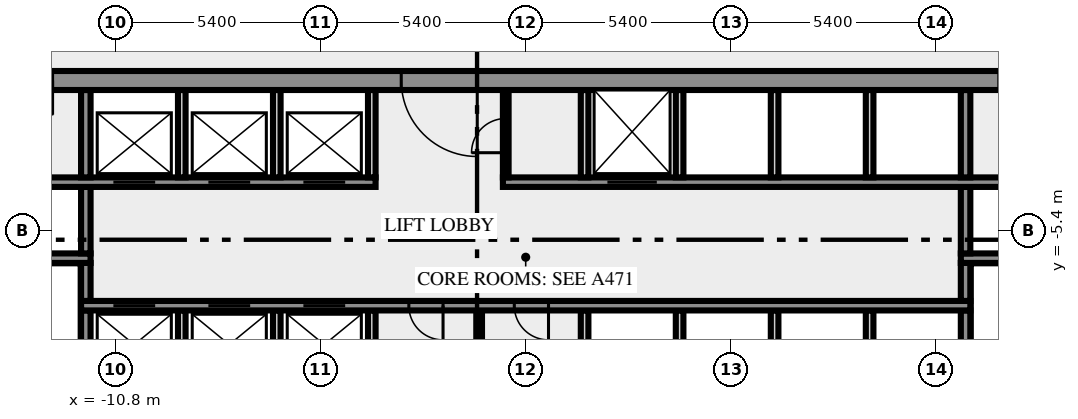
"""IFC4 building model, lengths in metres.
Left out: names, types, materials, properties, quantities, classifications, styles, units other than length and angle.
Written with IfcOpenShell. Run it as: python <this file> out.ifc"""

import sys

from ifc_helpers import new_model, si_unit, direction, frame, frame_2d, origin, place, context, subcontext, project, spatial, rectangle, extrude, element, fill, save


model = new_model("IFC4")
c1 = context("Model", 3, precision=1e-05, world=origin(), true_north=direction((0.0, 1.0)))
c2 = subcontext(c1, "Body", "Model", "MODEL_VIEW")
j1 = project(units=[si_unit("LENGTHUNIT", "METRE"), si_unit("PLANEANGLEUNIT", "RADIAN")], contexts=[c1])
p1 = place(None, origin())
s1 = spatial("IfcSite", under=j1, at=p1, CompositionType="ELEMENT")
p2 = place(p1, origin())
s2 = spatial("IfcBuilding", under=s1, at=p2, CompositionType="ELEMENT")
p3 = place(p2, frame((0.0, 0.0, 113.0)))
s3 = spatial("IfcBuildingStorey", under=s2, at=p3, CompositionType="ELEMENT", Elevation=113.0)
p4 = place(p3, frame((-11.575, -10.5, 0.0), z_axis=(0.0, 0.0, 1.0), x_axis=(0.0, 1.0, 0.0)))
e1 = element("IfcWall", 1, at=p4, inside=s3, PredefinedType="SHEAR", context=c2, shape_type="SweptSolid", body=[
    extrude(rectangle(XDim=3.0, YDim=0.25, at=frame_2d((1.5, 0.0))), origin(), (0.0, 0.0, 1.0), 3.65),
])
for number, where, z_axis, x_axis in (
    (2, (-9.05, -10.5, 0.0), (0.0, 0.0, 1.0), (0.0, 1.0, 0.0)),
    (3, (-6.55, -10.5, 0.0), (0.0, 0.0, 1.0), (0.0, 1.0, 0.0)),
    (4, (-4.05, -10.5, 0.0), (0.0, 0.0, 1.0), (0.0, 1.0, 0.0)),
):
    element("IfcWall", number, at=place(p3, frame(where, z_axis=z_axis, x_axis=x_axis)), inside=s3, PredefinedType="SOLIDWALL", context=c2, shape_type="SweptSolid", body=[
        extrude(rectangle(XDim=3.0, YDim=0.2, at=frame_2d((1.5, 0.0))), origin(), (0.0, 0.0, 1.0), 3.65),
    ])
p5 = place(p3, frame((-1.225, -10.5, 0.0), z_axis=(0.0, 0.0, 1.0), x_axis=(0.0, 1.0, 0.0)))
e5 = element("IfcWall", 5, at=p5, inside=s3, PredefinedType="PARTITIONING", context=c2, shape_type="SweptSolid", body=[
    extrude(rectangle(XDim=3.0, YDim=0.15, at=frame_2d((1.5, 0.0))), origin(), (0.0, 0.0, 1.0), 3.65),
])
for number, where, z_axis, x_axis in (
    (6, (1.55, -10.5, 0.0), (0.0, 0.0, 1.0), (0.0, 1.0, 0.0)),
    (7, (4.05, -10.5, 0.0), (0.0, 0.0, 1.0), (0.0, 1.0, 0.0)),
    (8, (6.55, -10.5, 0.0), (0.0, 0.0, 1.0), (0.0, 1.0, 0.0)),
    (9, (9.05, -10.5, 0.0), (0.0, 0.0, 1.0), (0.0, 1.0, 0.0)),
):
    element("IfcWall", number, at=place(p3, frame(where, z_axis=z_axis, x_axis=x_axis)), inside=s3, PredefinedType="SOLIDWALL", context=c2, shape_type="SweptSolid", body=[
        extrude(rectangle(XDim=3.0, YDim=0.2, at=frame_2d((1.5, 0.0))), origin(), (0.0, 0.0, 1.0), 3.65),
    ])
p6 = place(p3, frame((11.575, -10.5, 0.0), z_axis=(0.0, 0.0, 1.0), x_axis=(0.0, 1.0, 0.0)))
e10 = element("IfcWall", 10, at=p6, inside=s3, PredefinedType="SHEAR", context=c2, shape_type="SweptSolid", body=[
    extrude(rectangle(XDim=3.0, YDim=0.25, at=frame_2d((1.5, 0.0))), origin(), (0.0, 0.0, 1.0), 3.65),
])
p7 = place(p3, frame((11.7, -7.375, 0.0), z_axis=(0.0, 0.0, 1.0), x_axis=(-1.0, 0.0, 0.0)))
e11 = element("IfcWall", 11, at=p7, inside=s3, PredefinedType="SHEAR", context=c2, shape_type="SweptSolid", body=[
    extrude(rectangle(XDim=23.4, YDim=0.25, at=frame_2d((11.7, 0.0))), origin(), (0.0, 0.0, 1.0), 3.65),
])
p8 = place(p7, frame((21.45, 0.0, 0.0)))
e12 = element("IfcOpeningElement", 12, at=p8, cuts=e11, PredefinedType="OPENING", context=c2, shape_type="SweptSolid", body=[
    extrude(rectangle(XDim=1.1, YDim=2.1, at=frame_2d((0.55, 1.05))), frame((0.0, 0.135, 0.0), z_axis=(0.0, -1.0, 0.0), x_axis=(1.0, 0.0, 0.0)), (0.0, 0.0, 1.0), 0.27),
])
p9 = place(p7, frame((18.95, 0.0, 0.0)))
e13 = element("IfcOpeningElement", 13, at=p9, cuts=e11, PredefinedType="OPENING", context=c2, shape_type="SweptSolid", body=[
    extrude(rectangle(XDim=1.1, YDim=2.1, at=frame_2d((0.55, 1.05))), frame((0.0, 0.135, 0.0), z_axis=(0.0, -1.0, 0.0), x_axis=(1.0, 0.0, 0.0)), (0.0, 0.0, 1.0), 0.27),
])
p10 = place(p7, frame((16.45, 0.0, 0.0)))
e14 = element("IfcOpeningElement", 14, at=p10, cuts=e11, PredefinedType="OPENING", context=c2, shape_type="SweptSolid", body=[
    extrude(rectangle(XDim=1.1, YDim=2.1, at=frame_2d((0.55, 1.05))), frame((0.0, 0.135, 0.0), z_axis=(0.0, -1.0, 0.0), x_axis=(1.0, 0.0, 0.0)), (0.0, 0.0, 1.0), 0.27),
])
p11 = place(p7, frame((13.875, 0.0, 0.0)))
e15 = element("IfcOpeningElement", 15, at=p11, cuts=e11, PredefinedType="OPENING", context=c2, shape_type="SweptSolid", body=[
    extrude(rectangle(XDim=0.9, YDim=2.1, at=frame_2d((0.45, 1.05))), frame((0.0, 0.135, 0.0), z_axis=(0.0, -1.0, 0.0), x_axis=(1.0, 0.0, 0.0)), (0.0, 0.0, 1.0), 0.27),
])
p12 = place(p7, frame((11.1, 0.0, 0.0)))
e16 = element("IfcOpeningElement", 16, at=p12, cuts=e11, PredefinedType="OPENING", context=c2, shape_type="SweptSolid", body=[
    extrude(rectangle(XDim=0.9, YDim=2.1, at=frame_2d((0.45, 1.05))), frame((0.0, 0.135, 0.0), z_axis=(0.0, -1.0, 0.0), x_axis=(1.0, 0.0, 0.0)), (0.0, 0.0, 1.0), 0.27),
])
for number, where, z_axis, x_axis in (
    (17, (-11.575, -7.25, 0.0), (0.0, 0.0, 1.0), (0.0, 1.0, 0.0)),
    (18, (11.575, -7.25, 0.0), (0.0, 0.0, 1.0), (0.0, 1.0, 0.0)),
):
    element("IfcWall", number, at=place(p3, frame(where, z_axis=z_axis, x_axis=x_axis)), inside=s3, PredefinedType="SHEAR", context=c2, shape_type="SweptSolid", body=[
        extrude(rectangle(XDim=1.0, YDim=0.25, at=frame_2d((0.5, 0.0))), origin(), (0.0, 0.0, 1.0), 3.65),
    ])
p13 = place(p3, frame((-11.45, -6.125, 0.0), z_axis=(0.0, 0.0, 1.0), x_axis=(-1.0, 0.0, 0.0)))
e19 = element("IfcWall", 19, at=p13, inside=s3, PredefinedType="SHEAR", context=c2, shape_type="SweptSolid", body=[
    extrude(rectangle(XDim=8.05, YDim=0.25, at=frame_2d((4.025, 0.0))), origin(), (0.0, 0.0, 1.0), 3.65),
])
p14 = place(p13, frame((6.2, 0.0, 0.0)))
e20 = element("IfcOpeningElement", 20, at=p14, cuts=e19, PredefinedType="OPENING", context=c2, shape_type="SweptSolid", body=[
    extrude(rectangle(XDim=1.8, YDim=2.1, at=frame_2d((0.9, 1.05))), frame((0.0, 0.135, 0.0), z_axis=(0.0, -1.0, 0.0), x_axis=(1.0, 0.0, 0.0)), (0.0, 0.0, 1.0), 0.27),
])
p15 = place(p3, frame((19.5, -6.125, 0.0), z_axis=(0.0, 0.0, 1.0), x_axis=(-1.0, 0.0, 0.0)))
e21 = element("IfcWall", 21, at=p15, inside=s3, PredefinedType="SHEAR", context=c2, shape_type="SweptSolid", body=[
    extrude(rectangle(XDim=8.05, YDim=0.25, at=frame_2d((4.025, 0.0))), origin(), (0.0, 0.0, 1.0), 3.65),
])
p16 = place(p15, frame((0.05, 0.0, 0.0)))
e22 = element("IfcOpeningElement", 22, at=p16, cuts=e21, PredefinedType="OPENING", context=c2, shape_type="SweptSolid", body=[
    extrude(rectangle(XDim=1.8, YDim=2.1, at=frame_2d((0.9, 1.05))), frame((0.0, 0.135, 0.0), z_axis=(0.0, -1.0, 0.0), x_axis=(1.0, 0.0, 0.0)), (0.0, 0.0, 1.0), 0.27),
])
for number, where, z_axis, x_axis in (
    (23, (-11.575, -6.0, 0.0), (0.0, 0.0, 1.0), (0.0, 1.0, 0.0)),
    (24, (11.575, -6.0, 0.0), (0.0, 0.0, 1.0), (0.0, 1.0, 0.0)),
):
    element("IfcWall", number, at=place(p3, frame(where, z_axis=z_axis, x_axis=x_axis)), inside=s3, PredefinedType="SHEAR", context=c2, shape_type="SweptSolid", body=[
        extrude(rectangle(XDim=1.75, YDim=0.25, at=frame_2d((0.875, 0.0))), origin(), (0.0, 0.0, 1.0), 3.65),
    ])
p17 = place(p3, frame((-14.35, -4.125, 0.0), z_axis=(0.0, 0.0, 1.0), x_axis=(1.0, 0.0, 0.0)))
e25 = element("IfcWall", 25, at=p17, inside=s3, PredefinedType="SHEAR", context=c2, shape_type="SweptSolid", body=[
    extrude(rectangle(XDim=10.4, YDim=0.25, at=frame_2d((5.2, 0.0))), origin(), (0.0, 0.0, 1.0), 3.65),
])
p18 = place(p17, frame((3.5, 0.0, 0.0)))
e26 = element("IfcOpeningElement", 26, at=p18, cuts=e25, PredefinedType="OPENING", context=c2, shape_type="SweptSolid", body=[
    extrude(rectangle(XDim=1.1, YDim=2.1, at=frame_2d((0.55, 1.05))), frame((0.0, 0.135, 0.0), z_axis=(0.0, -1.0, 0.0), x_axis=(1.0, 0.0, 0.0)), (0.0, 0.0, 1.0), 0.27),
])
p19 = place(p17, frame((6.0, 0.0, 0.0)))
e27 = element("IfcOpeningElement", 27, at=p19, cuts=e25, PredefinedType="OPENING", context=c2, shape_type="SweptSolid", body=[
    extrude(rectangle(XDim=1.1, YDim=2.1, at=frame_2d((0.55, 1.05))), frame((0.0, 0.135, 0.0), z_axis=(0.0, -1.0, 0.0), x_axis=(1.0, 0.0, 0.0)), (0.0, 0.0, 1.0), 0.27),
])
p20 = place(p17, frame((8.5, 0.0, 0.0)))
e28 = element("IfcOpeningElement", 28, at=p20, cuts=e25, PredefinedType="OPENING", context=c2, shape_type="SweptSolid", body=[
    extrude(rectangle(XDim=1.1, YDim=2.1, at=frame_2d((0.55, 1.05))), frame((0.0, 0.135, 0.0), z_axis=(0.0, -1.0, 0.0), x_axis=(1.0, 0.0, 0.0)), (0.0, 0.0, 1.0), 0.27),
])
p21 = place(p3, frame((-0.6, -4.125, 0.0), z_axis=(0.0, 0.0, 1.0), x_axis=(1.0, 0.0, 0.0)))
e29 = element("IfcWall", 29, at=p21, inside=s3, PredefinedType="SHEAR", context=c2, shape_type="SweptSolid", body=[
    extrude(rectangle(XDim=14.95, YDim=0.25, at=frame_2d((7.475, 0.0))), origin(), (0.0, 0.0, 1.0), 3.65),
])
p22 = place(p21, frame((2.75, 0.0, 0.0)))
e30 = element("IfcOpeningElement", 30, at=p22, cuts=e29, PredefinedType="OPENING", context=c2, shape_type="SweptSolid", body=[
    extrude(rectangle(XDim=1.3, YDim=2.1, at=frame_2d((0.65, 1.05))), frame((0.0, 0.135, 0.0), z_axis=(0.0, -1.0, 0.0), x_axis=(1.0, 0.0, 0.0)), (0.0, 0.0, 1.0), 0.27),
])
p23 = place(p3, frame((-11.575, -4.0, 0.0), z_axis=(0.0, 0.0, 1.0), x_axis=(0.0, 1.0, 0.0)))
e31 = element("IfcWall", 31, at=p23, inside=s3, PredefinedType="SHEAR", context=c2, shape_type="SweptSolid", body=[
    extrude(rectangle(XDim=2.3, YDim=0.25, at=frame_2d((1.15, 0.0))), origin(), (0.0, 0.0, 1.0), 3.65),
])
for number, where, z_axis, x_axis in (
    (32, (-9.05, -4.0, 0.0), (0.0, 0.0, 1.0), (0.0, 1.0, 0.0)),
    (33, (-6.55, -4.0, 0.0), (0.0, 0.0, 1.0), (0.0, 1.0, 0.0)),
    (34, (-4.05, -4.0, 0.0), (0.0, 0.0, 1.0), (0.0, 1.0, 0.0)),
):
    element("IfcWall", number, at=place(p3, frame(where, z_axis=z_axis, x_axis=x_axis)), inside=s3, PredefinedType="SOLIDWALL", context=c2, shape_type="SweptSolid", body=[
        extrude(rectangle(XDim=2.3, YDim=0.2, at=frame_2d((1.15, 0.0))), origin(), (0.0, 0.0, 1.0), 3.65),
    ])
p24 = place(p3, frame((-0.525, -4.0, 0.0), z_axis=(0.0, 0.0, 1.0), x_axis=(0.0, 1.0, 0.0)))
e35 = element("IfcWall", 35, at=p24, inside=s3, PredefinedType="PARTITIONING", context=c2, shape_type="SweptSolid", body=[
    extrude(rectangle(XDim=2.3, YDim=0.15, at=frame_2d((1.15, 0.0))), origin(), (0.0, 0.0, 1.0), 3.65),
])
p25 = place(p24, frame((0.65, 0.0, 0.0)))
e36 = element("IfcOpeningElement", 36, at=p25, cuts=e35, PredefinedType="OPENING", context=c2, shape_type="SweptSolid", body=[
    extrude(rectangle(XDim=0.9, YDim=2.1, at=frame_2d((0.45, 1.05))), frame((0.0, 0.085, 0.0), z_axis=(0.0, -1.0, 0.0), x_axis=(1.0, 0.0, 0.0)), (0.0, 0.0, 1.0), 0.17),
])
for number, where, z_axis, x_axis in (
    (37, (1.55, -4.0, 0.0), (0.0, 0.0, 1.0), (0.0, 1.0, 0.0)),
    (38, (4.05, -4.0, 0.0), (0.0, 0.0, 1.0), (0.0, 1.0, 0.0)),
    (39, (6.55, -4.0, 0.0), (0.0, 0.0, 1.0), (0.0, 1.0, 0.0)),
    (40, (9.05, -4.0, 0.0), (0.0, 0.0, 1.0), (0.0, 1.0, 0.0)),
):
    element("IfcWall", number, at=place(p3, frame(where, z_axis=z_axis, x_axis=x_axis)), inside=s3, PredefinedType="SOLIDWALL", context=c2, shape_type="SweptSolid", body=[
        extrude(rectangle(XDim=2.3, YDim=0.2, at=frame_2d((1.15, 0.0))), origin(), (0.0, 0.0, 1.0), 3.65),
    ])
p26 = place(p3, frame((11.575, -4.0, 0.0), z_axis=(0.0, 0.0, 1.0), x_axis=(0.0, 1.0, 0.0)))
e41 = element("IfcWall", 41, at=p26, inside=s3, PredefinedType="SHEAR", context=c2, shape_type="SweptSolid", body=[
    extrude(rectangle(XDim=2.3, YDim=0.25, at=frame_2d((1.15, 0.0))), origin(), (0.0, 0.0, 1.0), 3.65),
])
p27 = place(p3, frame((20.49, -1.45, 0.0), z_axis=(0.0, 0.0, 1.0), x_axis=(-1.0, 0.0, 0.0)))
e42 = element("IfcWall", 42, at=p27, inside=s3, PredefinedType="SHEAR", context=c2, shape_type="SweptSolid", body=[
    extrude(rectangle(XDim=40.98, YDim=0.5, at=frame_2d((20.49, 0.0))), origin(), (0.0, 0.0, 1.0), 3.65),
])
p28 = place(p27, frame((38.14, 0.0, 0.0)))
e43 = element("IfcOpeningElement", 43, at=p28, cuts=e42, PredefinedType="OPENING", context=c2, shape_type="SweptSolid", body=[
    extrude(rectangle(XDim=1.8, YDim=2.1, at=frame_2d((0.9, 1.05))), frame((0.0, 0.26, 0.0), z_axis=(0.0, -1.0, 0.0), x_axis=(1.0, 0.0, 0.0)), (0.0, 0.0, 1.0), 0.52),
])
p29 = place(p27, frame((36.728, 0.0, 0.0)))
e44 = element("IfcOpeningElement", 44, at=p29, cuts=e42, PredefinedType="OPENING", context=c2, shape_type="SweptSolid", body=[
    extrude(rectangle(XDim=0.8, YDim=2.1, at=frame_2d((0.4, 1.05))), frame((0.0, 0.26, 0.0), z_axis=(0.0, -1.0, 0.0), x_axis=(1.0, 0.0, 0.0)), (0.0, 0.0, 1.0), 0.52),
])
p30 = place(p27, frame((35.153, 0.0, 0.0)))
e45 = element("IfcOpeningElement", 45, at=p30, cuts=e42, PredefinedType="OPENING", context=c2, shape_type="SweptSolid", body=[
    extrude(rectangle(XDim=0.8, YDim=2.1, at=frame_2d((0.4, 1.05))), frame((0.0, 0.26, 0.0), z_axis=(0.0, -1.0, 0.0), x_axis=(1.0, 0.0, 0.0)), (0.0, 0.0, 1.0), 0.52),
])
p31 = place(p27, frame((32.94, 0.0, 0.0)))
e46 = element("IfcOpeningElement", 46, at=p31, cuts=e42, PredefinedType="OPENING", context=c2, shape_type="SweptSolid", body=[
    extrude(rectangle(XDim=0.9, YDim=2.1, at=frame_2d((0.45, 1.05))), frame((0.0, 0.26, 0.0), z_axis=(0.0, -1.0, 0.0), x_axis=(1.0, 0.0, 0.0)), (0.0, 0.0, 1.0), 0.52),
])
p32 = place(p27, frame((21.765, 0.0, 0.0)))
e47 = element("IfcOpeningElement", 47, at=p32, cuts=e42, PredefinedType="OPENING", context=c2, shape_type="SweptSolid", body=[
    extrude(rectangle(XDim=2.0, YDim=2.1, at=frame_2d((1.0, 1.05))), frame((0.0, 0.26, 0.0), z_axis=(0.0, -1.0, 0.0), x_axis=(1.0, 0.0, 0.0)), (0.0, 0.0, 1.0), 0.52),
])
p33 = place(p27, frame((7.14, 0.0, 0.0)))
e48 = element("IfcOpeningElement", 48, at=p33, cuts=e42, PredefinedType="OPENING", context=c2, shape_type="SweptSolid", body=[
    extrude(rectangle(XDim=0.9, YDim=2.1, at=frame_2d((0.45, 1.05))), frame((0.0, 0.26, 0.0), z_axis=(0.0, -1.0, 0.0), x_axis=(1.0, 0.0, 0.0)), (0.0, 0.0, 1.0), 0.52),
])
p34 = place(p27, frame((4.19, 0.0, 0.0)))
e49 = element("IfcOpeningElement", 49, at=p34, cuts=e42, PredefinedType="OPENING", context=c2, shape_type="SweptSolid", body=[
    extrude(rectangle(XDim=0.9, YDim=2.1, at=frame_2d((0.45, 1.05))), frame((0.0, 0.26, 0.0), z_axis=(0.0, -1.0, 0.0), x_axis=(1.0, 0.0, 0.0)), (0.0, 0.0, 1.0), 0.52),
])
p35 = place(p27, frame((1.04, 0.0, 0.0)))
e50 = element("IfcOpeningElement", 50, at=p35, cuts=e42, PredefinedType="OPENING", context=c2, shape_type="SweptSolid", body=[
    extrude(rectangle(XDim=1.8, YDim=2.1, at=frame_2d((0.9, 1.05))), frame((0.0, 0.26, 0.0), z_axis=(0.0, -1.0, 0.0), x_axis=(1.0, 0.0, 0.0)), (0.0, 0.0, 1.0), 0.52),
])
p36 = place(p8, origin())
e51 = element("IfcDoor", 51, at=p36, inside=s3, OperationType="DOUBLE_DOOR_SLIDING", PredefinedType="DOOR", context=c2, shape_type="SweptSolid", body=[
    extrude(rectangle(XDim=1.1, YDim=2.1, at=frame_2d((0.55, 1.05))), frame((0.0, 0.025, 0.0), z_axis=(0.0, -1.0, 0.0), x_axis=(1.0, 0.0, 0.0)), (0.0, 0.0, 1.0), 0.05),
])
fill(e12, e51)
p37 = place(p9, origin())
e52 = element("IfcDoor", 52, at=p37, inside=s3, OperationType="DOUBLE_DOOR_SLIDING", PredefinedType="DOOR", context=c2, shape_type="SweptSolid", body=[
    extrude(rectangle(XDim=1.1, YDim=2.1, at=frame_2d((0.55, 1.05))), frame((0.0, 0.025, 0.0), z_axis=(0.0, -1.0, 0.0), x_axis=(1.0, 0.0, 0.0)), (0.0, 0.0, 1.0), 0.05),
])
fill(e13, e52)
p38 = place(p10, origin())
e53 = element("IfcDoor", 53, at=p38, inside=s3, OperationType="DOUBLE_DOOR_SLIDING", PredefinedType="DOOR", context=c2, shape_type="SweptSolid", body=[
    extrude(rectangle(XDim=1.1, YDim=2.1, at=frame_2d((0.55, 1.05))), frame((0.0, 0.025, 0.0), z_axis=(0.0, -1.0, 0.0), x_axis=(1.0, 0.0, 0.0)), (0.0, 0.0, 1.0), 0.05),
])
fill(e14, e53)
p39 = place(p11, origin())
e54 = element("IfcDoor", 54, at=p39, inside=s3, OperationType="SINGLE_SWING_RIGHT", PredefinedType="DOOR", context=c2, shape_type="SweptSolid", body=[
    extrude(rectangle(XDim=0.9, YDim=2.1, at=frame_2d((0.45, 1.05))), frame((0.0, 0.025, 0.0), z_axis=(0.0, -1.0, 0.0), x_axis=(1.0, 0.0, 0.0)), (0.0, 0.0, 1.0), 0.05),
])
fill(e15, e54)
p40 = place(p12, origin())
e55 = element("IfcDoor", 55, at=p40, inside=s3, OperationType="SINGLE_SWING_LEFT", PredefinedType="DOOR", context=c2, shape_type="SweptSolid", body=[
    extrude(rectangle(XDim=0.9, YDim=2.1, at=frame_2d((0.45, 1.05))), frame((0.0, 0.025, 0.0), z_axis=(0.0, -1.0, 0.0), x_axis=(1.0, 0.0, 0.0)), (0.0, 0.0, 1.0), 0.05),
])
fill(e16, e55)
p41 = place(p18, origin())
e56 = element("IfcDoor", 56, at=p41, inside=s3, OperationType="DOUBLE_DOOR_SLIDING", PredefinedType="DOOR", context=c2, shape_type="SweptSolid", body=[
    extrude(rectangle(XDim=1.1, YDim=2.1, at=frame_2d((0.55, 1.05))), frame((0.0, 0.025, 0.0), z_axis=(0.0, -1.0, 0.0), x_axis=(1.0, 0.0, 0.0)), (0.0, 0.0, 1.0), 0.05),
])
fill(e26, e56)
p42 = place(p19, origin())
e57 = element("IfcDoor", 57, at=p42, inside=s3, OperationType="DOUBLE_DOOR_SLIDING", PredefinedType="DOOR", context=c2, shape_type="SweptSolid", body=[
    extrude(rectangle(XDim=1.1, YDim=2.1, at=frame_2d((0.55, 1.05))), frame((0.0, 0.025, 0.0), z_axis=(0.0, -1.0, 0.0), x_axis=(1.0, 0.0, 0.0)), (0.0, 0.0, 1.0), 0.05),
])
fill(e27, e57)
p43 = place(p20, origin())
e58 = element("IfcDoor", 58, at=p43, inside=s3, OperationType="DOUBLE_DOOR_SLIDING", PredefinedType="DOOR", context=c2, shape_type="SweptSolid", body=[
    extrude(rectangle(XDim=1.1, YDim=2.1, at=frame_2d((0.55, 1.05))), frame((0.0, 0.025, 0.0), z_axis=(0.0, -1.0, 0.0), x_axis=(1.0, 0.0, 0.0)), (0.0, 0.0, 1.0), 0.05),
])
fill(e28, e58)
p44 = place(p22, origin())
e59 = element("IfcDoor", 59, at=p44, inside=s3, OperationType="DOUBLE_DOOR_SLIDING", PredefinedType="DOOR", context=c2, shape_type="SweptSolid", body=[
    extrude(rectangle(XDim=1.3, YDim=2.1, at=frame_2d((0.65, 1.05))), frame((0.0, 0.025, 0.0), z_axis=(0.0, -1.0, 0.0), x_axis=(1.0, 0.0, 0.0)), (0.0, 0.0, 1.0), 0.05),
])
fill(e30, e59)
p45 = place(p25, origin())
e60 = element("IfcDoor", 60, at=p45, inside=s3, OperationType="SINGLE_SWING_LEFT", PredefinedType="DOOR", context=c2, shape_type="SweptSolid", body=[
    extrude(rectangle(XDim=0.9, YDim=2.1, at=frame_2d((0.45, 1.05))), frame((0.0, 0.025, 0.0), z_axis=(0.0, -1.0, 0.0), x_axis=(1.0, 0.0, 0.0)), (0.0, 0.0, 1.0), 0.05),
])
fill(e36, e60)
p46 = place(p32, origin())
e61 = element("IfcDoor", 61, at=p46, inside=s3, OperationType="DOUBLE_DOOR_SINGLE_SWING", PredefinedType="DOOR", context=c2, shape_type="SweptSolid", body=[
    extrude(rectangle(XDim=2.0, YDim=2.1, at=frame_2d((1.0, 1.05))), frame((0.0, 0.025, 0.0), z_axis=(0.0, -1.0, 0.0), x_axis=(1.0, 0.0, 0.0)), (0.0, 0.0, 1.0), 0.05),
])
fill(e47, e61)
save(model, sys.argv[1])
